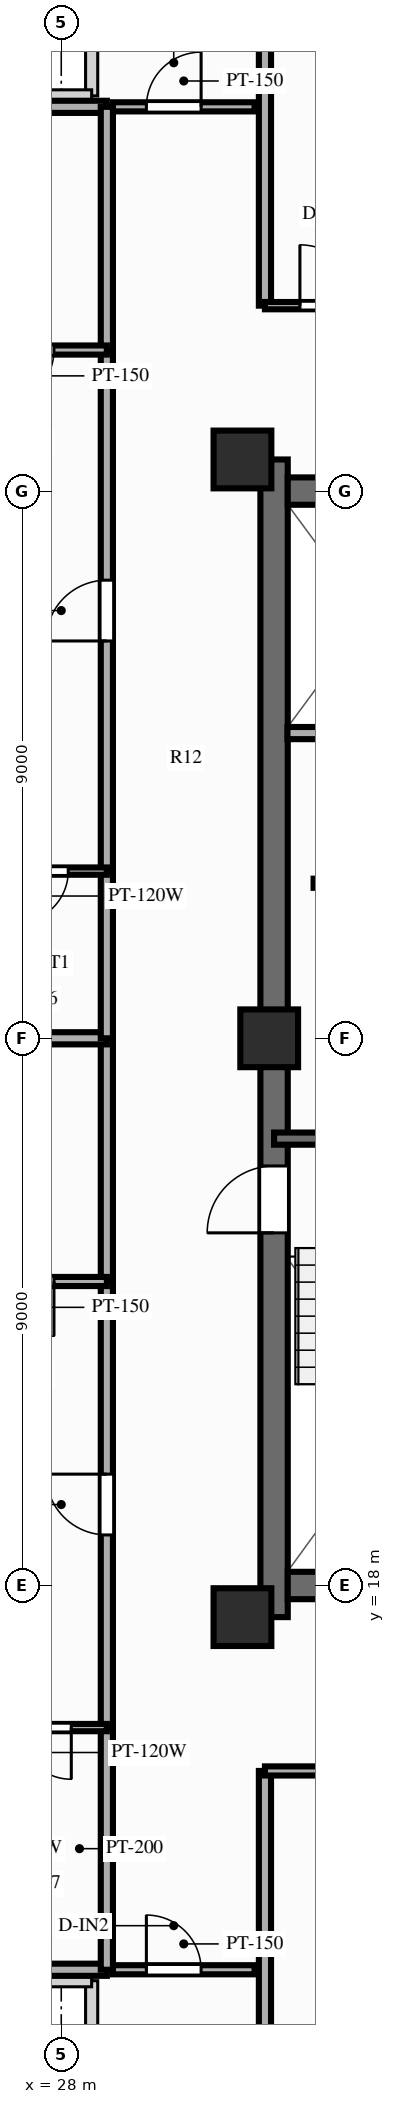
"""IFC4 building model, lengths in metres.
Left out: names, types, materials, properties, quantities, classifications, styles, units other than length and angle.
Written with IfcOpenShell. Run it as: python <this file> out.ifc"""

import sys

from ifc_helpers import new_model, si_unit, direction, frame, frame_2d, origin, origin_2d, place, context, subcontext, project, spatial, rectangle, extrude, source, transform, mapped, element, fill, save


model = new_model("IFC4")
c1 = context("Model", 3, precision=1e-05, world=origin(), true_north=direction((0.0, 1.0)))
c2 = subcontext(c1, "Body", "Model", "MODEL_VIEW")
j1 = project(units=[si_unit("LENGTHUNIT", "METRE"), si_unit("PLANEANGLEUNIT", "RADIAN")], contexts=[c1])
p1 = place(None, origin())
s1 = spatial("IfcSite", under=j1, at=p1, CompositionType="ELEMENT")
p2 = place(p1, origin())
s2 = spatial("IfcBuilding", under=s1, at=p2, CompositionType="ELEMENT")
p3 = place(p2, frame((0.0, 0.0, 246.0)))
s3 = spatial("IfcBuildingStorey", under=s2, at=p3, CompositionType="ELEMENT", Elevation=246.0)
p4 = place(p3, frame((31.5, 17.48, 0.0), z_axis=(0.0, 0.0, 1.0), x_axis=(0.0, 1.0, 0.0)))
e1 = element("IfcWall", 1, at=p4, inside=s3, PredefinedType="SHEAR", context=c2, shape_type="SweptSolid", body=[
    extrude(rectangle(XDim=19.04, YDim=0.45, at=frame_2d((9.52, 0.0))), origin(), (0.0, 0.0, 1.0), 3.0),
])
p5 = place(p4, frame((6.32, 0.0, 0.0)))
e2 = element("IfcOpeningElement", 2, at=p5, cuts=e1, PredefinedType="OPENING", context=c2, shape_type="SweptSolid", body=[
    extrude(rectangle(XDim=1.1, YDim=2.15, at=frame_2d((0.55, 1.075))), frame((0.0, 0.237, 0.0), z_axis=(0.0, -1.0, 0.0), x_axis=(1.0, 0.0, 0.0)), (0.0, 0.0, 1.0), 0.474),
])
p6 = place(p3, frame((31.725, 18.0, 0.0), z_axis=(0.0, 0.0, 1.0), x_axis=(1.0, 0.0, 0.0)))
e3 = element("IfcWall", 3, at=p6, inside=s3, PredefinedType="SHEAR", context=c2, shape_type="SweptSolid", body=[
    extrude(rectangle(XDim=12.55, YDim=0.45, at=frame_2d((6.275, 0.0))), origin(), (0.0, 0.0, 1.0), 3.0),
])
p7 = place(p3, frame((31.725, 36.0, 0.0), z_axis=(0.0, 0.0, 1.0), x_axis=(1.0, 0.0, 0.0)))
e4 = element("IfcWall", 4, at=p7, inside=s3, PredefinedType="SHEAR", context=c2, shape_type="SweptSolid", body=[
    extrude(rectangle(XDim=12.55, YDim=0.45, at=frame_2d((6.275, 0.0))), origin(), (0.0, 0.0, 1.0), 3.0),
])
p8 = place(p7, frame((5.225, 0.0, 0.0), z_axis=(0.0, 0.0, 1.0), x_axis=(-1.0, 0.0, 0.0)))
e5 = element("IfcOpeningElement", 5, at=p8, cuts=e4, PredefinedType="OPENING", context=c2, shape_type="SweptSolid", body=[
    extrude(rectangle(XDim=1.4, YDim=2.15, at=frame_2d((0.7, 1.075))), frame((0.0, 0.237, 0.0), z_axis=(0.0, -1.0, 0.0), x_axis=(1.0, 0.0, 0.0)), (0.0, 0.0, 1.0), 0.474),
])
m1 = source(origin(), c2, "Body", "SweptSolid", [
    extrude(rectangle(XDim=0.95, YDim=0.95, at=origin_2d()), origin(), (0.0, 0.0, 1.0), 3.0),
])
for number, where, z_axis, x_axis in (
    (6, (30.98, 17.48, 0.0), (0.0, 0.0, 1.0), (1.0, 0.0, 0.0)),
    (7, (30.98, 36.52, 0.0), (0.0, 0.0, 1.0), (1.0, 0.0, 0.0)),
    (8, (31.42, 27.0, 0.0), (0.0, 0.0, 1.0), (1.0, 0.0, 0.0)),
):
    element("IfcColumn", number, at=place(p3, frame(where, z_axis=z_axis, x_axis=x_axis)), inside=s3, PredefinedType="COLUMN", context=c2, shape_type="MappedRepresentation", body=[
        mapped(m1, transform((0.0, 0.0, 0.0), scale=1.0)),
    ])
p9 = place(p3, frame((32.15, 29.55, 0.0), z_axis=(0.0, 0.0, 1.0), x_axis=(1.0, 0.0, 0.0)))
e9 = element("IfcWall", 9, at=p9, inside=s3, PredefinedType="PARTITIONING", context=c2, shape_type="SweptSolid", body=[
    extrude(rectangle(XDim=2.27, YDim=0.15, at=frame_2d((1.135, 0.0))), origin(), (0.0, 0.0, 1.0), 2.74),
])
p10 = place(p3, frame((31.5, 25.35, 0.0), z_axis=(0.0, 0.0, 1.0), x_axis=(1.0, 0.0, 0.0)))
e10 = element("IfcWall", 10, at=p10, inside=s3, PredefinedType="SOLIDWALL", context=c2, shape_type="SweptSolid", body=[
    extrude(rectangle(XDim=3.93, YDim=0.2, at=frame_2d((1.965, 0.0))), origin(), (0.0, 0.0, 1.0), 2.74),
])
p11 = place(p3, frame((31.72, 32.02, 0.0), z_axis=(0.0, 0.0, 1.0), x_axis=(1.0, 0.0, 0.0)))
e11 = element("IfcWall", 11, at=p11, inside=s3, PredefinedType="PARTITIONING", context=c2, shape_type="SweptSolid", body=[
    extrude(rectangle(XDim=2.8, YDim=0.2, at=frame_2d((1.4, 0.0))), origin(), (0.0, 0.0, 1.0), 2.74),
])
p12 = place(p3, frame((28.85, 11.68, 0.0), z_axis=(0.0, 0.0, 1.0), x_axis=(1.0, 0.0, 0.0)))
e12 = element("IfcWall", 12, at=p12, inside=s3, PredefinedType="PARTITIONING", context=c2, shape_type="SweptSolid", body=[
    extrude(rectangle(XDim=2.33, YDim=0.15, at=frame_2d((1.165, 0.0))), origin(), (0.0, 0.0, 1.0), 2.74),
])
p13 = place(p12, frame((0.55, 0.0, 0.0)))
e13 = element("IfcOpeningElement", 13, at=p13, cuts=e12, PredefinedType="OPENING", context=c2, shape_type="SweptSolid", body=[
    extrude(rectangle(XDim=0.9, YDim=2.1, at=frame_2d((0.45, 1.05))), frame((0.0, 0.087, 0.0), z_axis=(0.0, -1.0, 0.0), x_axis=(1.0, 0.0, 0.0)), (0.0, 0.0, 1.0), 0.174),
])
p14 = place(p3, frame((28.85, 42.32, 0.0), z_axis=(0.0, 0.0, 1.0), x_axis=(1.0, 0.0, 0.0)))
e14 = element("IfcWall", 14, at=p14, inside=s3, PredefinedType="PARTITIONING", context=c2, shape_type="SweptSolid", body=[
    extrude(rectangle(XDim=2.33, YDim=0.15, at=frame_2d((1.165, 0.0))), origin(), (0.0, 0.0, 1.0), 2.74),
])
p15 = place(p14, frame((0.55, 0.0, 0.0)))
e15 = element("IfcOpeningElement", 15, at=p15, cuts=e14, PredefinedType="OPENING", context=c2, shape_type="SweptSolid", body=[
    extrude(rectangle(XDim=0.9, YDim=2.1, at=frame_2d((0.45, 1.05))), frame((0.0, 0.087, 0.0), z_axis=(0.0, -1.0, 0.0), x_axis=(1.0, 0.0, 0.0)), (0.0, 0.0, 1.0), 0.174),
])
p16 = place(p3, frame((31.35, 14.95, 0.0), z_axis=(0.0, 0.0, 1.0), x_axis=(0.0, -1.0, 0.0)))
e16 = element("IfcWall", 16, at=p16, inside=s3, PredefinedType="PARTITIONING", context=c2, shape_type="SweptSolid", body=[
    extrude(rectangle(XDim=8.8, YDim=0.2, at=frame_2d((4.4, 0.0))), origin(), (0.0, 0.0, 1.0), 2.39),
])
p17 = place(p3, frame((31.35, 14.95, 0.0), z_axis=(0.0, 0.0, 1.0), x_axis=(1.0, 0.0, 0.0)))
e17 = element("IfcWall", 17, at=p17, inside=s3, PredefinedType="PARTITIONING", context=c2, shape_type="SweptSolid", body=[
    extrude(rectangle(XDim=6.65, YDim=0.15, at=frame_2d((3.325, 0.0))), origin(), (0.0, 0.0, 1.0), 2.74),
])
p18 = place(p17, frame((2.775, 0.0, 0.0)))
e18 = element("IfcOpeningElement", 18, at=p18, cuts=e17, PredefinedType="OPENING", context=c2, shape_type="SweptSolid", body=[
    extrude(rectangle(XDim=1.1, YDim=2.15, at=frame_2d((0.55, 1.075))), frame((0.0, 0.087, 0.0), z_axis=(0.0, -1.0, 0.0), x_axis=(1.0, 0.0, 0.0)), (0.0, 0.0, 1.0), 0.174),
])
p19 = place(p3, frame((31.35, 39.05, 0.0), z_axis=(0.0, 0.0, 1.0), x_axis=(0.0, 1.0, 0.0)))
e19 = element("IfcWall", 19, at=p19, inside=s3, PredefinedType="PARTITIONING", context=c2, shape_type="SweptSolid", body=[
    extrude(rectangle(XDim=8.8, YDim=0.2, at=frame_2d((4.4, 0.0))), origin(), (0.0, 0.0, 1.0), 2.39),
])
p20 = place(p3, frame((31.35, 39.05, 0.0), z_axis=(0.0, 0.0, 1.0), x_axis=(1.0, 0.0, 0.0)))
e20 = element("IfcWall", 20, at=p20, inside=s3, PredefinedType="PARTITIONING", context=c2, shape_type="SweptSolid", body=[
    extrude(rectangle(XDim=2.15, YDim=0.12, at=frame_2d((1.075, 0.0))), origin(), (0.0, 0.0, 1.0), 2.74),
])
p21 = place(p20, frame((0.575, 0.0, 0.0)))
e21 = element("IfcOpeningElement", 21, at=p21, cuts=e20, PredefinedType="OPENING", context=c2, shape_type="SweptSolid", body=[
    extrude(rectangle(XDim=1.0, YDim=2.1, at=frame_2d((0.5, 1.05))), frame((0.0, 0.072, 0.0), z_axis=(0.0, -1.0, 0.0), x_axis=(1.0, 0.0, 0.0)), (0.0, 0.0, 1.0), 0.144),
])
for number, where, z_axis, x_axis in (
    (22, (28.75, 11.68, 0.0), (0.0, 0.0, 1.0), (-1.0, 0.0, 0.0)),
    (23, (28.75, 42.32, 0.0), (0.0, 0.0, 1.0), (-1.0, 0.0, 0.0)),
):
    element("IfcWall", number, at=place(p3, frame(where, z_axis=z_axis, x_axis=x_axis)), inside=s3, PredefinedType="PARTITIONING", context=c2, shape_type="SweptSolid", body=[
        extrude(rectangle(XDim=5.6, YDim=0.2, at=frame_2d((2.8, 0.0))), origin(), (0.0, 0.0, 1.0), 2.74),
    ])
p22 = place(p3, frame((28.75, 11.68, 0.0), z_axis=(0.0, 0.0, 1.0), x_axis=(0.0, 1.0, 0.0)))
e24 = element("IfcWall", 24, at=p22, inside=s3, PredefinedType="PARTITIONING", context=c2, shape_type="SweptSolid", body=[
    extrude(rectangle(XDim=3.983, YDim=0.2, at=frame_2d((1.992, 0.0))), origin(), (0.0, 0.0, 1.0), 2.74),
])
p23 = place(p3, frame((28.75, 15.663, 0.0), z_axis=(0.0, 0.0, 1.0), x_axis=(0.0, 1.0, 0.0)))
e25 = element("IfcWall", 25, at=p23, inside=s3, PredefinedType="PARTITIONING", context=c2, shape_type="SweptSolid", body=[
    extrude(rectangle(XDim=7.337, YDim=0.2, at=frame_2d((3.668, 0.0))), origin(), (0.0, 0.0, 1.0), 2.74),
])
p24 = place(p23, frame((3.168, 0.0, 0.0)))
e26 = element("IfcOpeningElement", 26, at=p24, cuts=e25, PredefinedType="OPENING", context=c2, shape_type="SweptSolid", body=[
    extrude(rectangle(XDim=1.0, YDim=2.15, at=frame_2d((0.5, 1.075))), frame((0.0, 0.112, 0.0), z_axis=(0.0, -1.0, 0.0), x_axis=(1.0, 0.0, 0.0)), (0.0, 0.0, 1.0), 0.224),
])
p25 = place(p3, frame((28.75, 23.0, 0.0), z_axis=(0.0, 0.0, 1.0), x_axis=(0.0, 1.0, 0.0)))
e27 = element("IfcWall", 27, at=p25, inside=s3, PredefinedType="PARTITIONING", context=c2, shape_type="SweptSolid", body=[
    extrude(rectangle(XDim=4.0, YDim=0.2, at=frame_2d((2.0, 0.0))), origin(), (0.0, 0.0, 1.0), 2.74),
])
p26 = place(p3, frame((28.75, 15.663, 0.0), z_axis=(0.0, 0.0, 1.0), x_axis=(-1.0, 0.0, 0.0)))
e28 = element("IfcWall", 28, at=p26, inside=s3, PredefinedType="PARTITIONING", context=c2, shape_type="SweptSolid", body=[
    extrude(rectangle(XDim=2.02, YDim=0.12, at=frame_2d((1.01, 0.0))), origin(), (0.0, 0.0, 1.0), 2.74),
])
p27 = place(p26, frame((0.585, 0.0, 0.0)))
e29 = element("IfcOpeningElement", 29, at=p27, cuts=e28, PredefinedType="OPENING", context=c2, shape_type="SweptSolid", body=[
    extrude(rectangle(XDim=0.85, YDim=2.05, at=frame_2d((0.425, 1.025))), frame((0.0, 0.072, 0.0), z_axis=(0.0, -1.0, 0.0), x_axis=(1.0, 0.0, 0.0)), (0.0, 0.0, 1.0), 0.144),
])
p28 = place(p3, frame((28.75, 23.0, 0.0), z_axis=(0.0, 0.0, 1.0), x_axis=(-1.0, 0.0, 0.0)))
e30 = element("IfcWall", 30, at=p28, inside=s3, PredefinedType="PARTITIONING", context=c2, shape_type="SweptSolid", body=[
    extrude(rectangle(XDim=2.64, YDim=0.15, at=frame_2d((1.32, 0.0))), origin(), (0.0, 0.0, 1.0), 2.74),
])
p29 = place(p28, frame((0.87, 0.0, 0.0)))
e31 = element("IfcOpeningElement", 31, at=p29, cuts=e30, PredefinedType="OPENING", context=c2, shape_type="SweptSolid", body=[
    extrude(rectangle(XDim=0.9, YDim=2.1, at=frame_2d((0.45, 1.05))), frame((0.0, 0.087, 0.0), z_axis=(0.0, -1.0, 0.0), x_axis=(1.0, 0.0, 0.0)), (0.0, 0.0, 1.0), 0.174),
])
p30 = place(p3, frame((28.75, 27.0, 0.0), z_axis=(0.0, 0.0, 1.0), x_axis=(-1.0, 0.0, 0.0)))
e32 = element("IfcWall", 32, at=p30, inside=s3, PredefinedType="PARTITIONING", context=c2, shape_type="SweptSolid", body=[
    extrude(rectangle(XDim=5.6, YDim=0.2, at=frame_2d((2.8, 0.0))), origin(), (0.0, 0.0, 1.0), 2.74),
])
p31 = place(p3, frame((28.75, 27.0, 0.0), z_axis=(0.0, 0.0, 1.0), x_axis=(0.0, 1.0, 0.0)))
e33 = element("IfcWall", 33, at=p31, inside=s3, PredefinedType="PARTITIONING", context=c2, shape_type="SweptSolid", body=[
    extrude(rectangle(XDim=2.75, YDim=0.2, at=frame_2d((1.375, 0.0))), origin(), (0.0, 0.0, 1.0), 2.74),
])
p32 = place(p3, frame((28.75, 29.75, 0.0), z_axis=(0.0, 0.0, 1.0), x_axis=(0.0, 1.0, 0.0)))
e34 = element("IfcWall", 34, at=p32, inside=s3, PredefinedType="PARTITIONING", context=c2, shape_type="SweptSolid", body=[
    extrude(rectangle(XDim=8.57, YDim=0.2, at=frame_2d((4.285, 0.0))), origin(), (0.0, 0.0, 1.0), 2.74),
])
p33 = place(p32, frame((3.785, 0.0, 0.0)))
e35 = element("IfcOpeningElement", 35, at=p33, cuts=e34, PredefinedType="OPENING", context=c2, shape_type="SweptSolid", body=[
    extrude(rectangle(XDim=1.0, YDim=2.15, at=frame_2d((0.5, 1.075))), frame((0.0, 0.112, 0.0), z_axis=(0.0, -1.0, 0.0), x_axis=(1.0, 0.0, 0.0)), (0.0, 0.0, 1.0), 0.224),
])
p34 = place(p3, frame((28.75, 38.32, 0.0), z_axis=(0.0, 0.0, 1.0), x_axis=(0.0, 1.0, 0.0)))
e36 = element("IfcWall", 36, at=p34, inside=s3, PredefinedType="PARTITIONING", context=c2, shape_type="SweptSolid", body=[
    extrude(rectangle(XDim=4.0, YDim=0.2, at=frame_2d((2.0, 0.0))), origin(), (0.0, 0.0, 1.0), 2.74),
])
p35 = place(p3, frame((28.75, 29.75, 0.0), z_axis=(0.0, 0.0, 1.0), x_axis=(-1.0, 0.0, 0.0)))
e37 = element("IfcWall", 37, at=p35, inside=s3, PredefinedType="PARTITIONING", context=c2, shape_type="SweptSolid", body=[
    extrude(rectangle(XDim=2.12, YDim=0.12, at=frame_2d((1.06, 0.0))), origin(), (0.0, 0.0, 1.0), 2.74),
])
p36 = place(p35, frame((0.635, 0.0, 0.0)))
e38 = element("IfcOpeningElement", 38, at=p36, cuts=e37, PredefinedType="OPENING", context=c2, shape_type="SweptSolid", body=[
    extrude(rectangle(XDim=0.85, YDim=2.05, at=frame_2d((0.425, 1.025))), frame((0.0, 0.072, 0.0), z_axis=(0.0, -1.0, 0.0), x_axis=(1.0, 0.0, 0.0)), (0.0, 0.0, 1.0), 0.144),
])
p37 = place(p3, frame((28.75, 38.32, 0.0), z_axis=(0.0, 0.0, 1.0), x_axis=(-1.0, 0.0, 0.0)))
e39 = element("IfcWall", 39, at=p37, inside=s3, PredefinedType="PARTITIONING", context=c2, shape_type="SweptSolid", body=[
    extrude(rectangle(XDim=2.64, YDim=0.15, at=frame_2d((1.32, 0.0))), origin(), (0.0, 0.0, 1.0), 2.74),
])
p38 = place(p37, frame((0.87, 0.0, 0.0)))
e40 = element("IfcOpeningElement", 40, at=p38, cuts=e39, PredefinedType="OPENING", context=c2, shape_type="SweptSolid", body=[
    extrude(rectangle(XDim=0.9, YDim=2.1, at=frame_2d((0.45, 1.05))), frame((0.0, 0.087, 0.0), z_axis=(0.0, -1.0, 0.0), x_axis=(1.0, 0.0, 0.0)), (0.0, 0.0, 1.0), 0.174),
])
m2 = source(origin(), c2, "Body", "SweptSolid", [
    extrude(rectangle(XDim=1.1, YDim=2.15, at=frame_2d((0.55, 1.075))), frame((0.0, 0.025, 0.0), z_axis=(0.0, -1.0, 0.0), x_axis=(1.0, 0.0, 0.0)), (0.0, 0.0, 1.0), 0.05),
])
p39 = place(p5, origin())
e41 = element("IfcDoor", 41, at=p39, inside=s3, OperationType="SINGLE_SWING_LEFT", PredefinedType="DOOR", context=c2, shape_type="MappedRepresentation", body=[
    mapped(m2, transform((0.0, 0.0, 0.0), scale=1.0)),
])
fill(e2, e41)
m3 = source(origin(), c2, "Body", "SweptSolid", [
    extrude(rectangle(XDim=0.9, YDim=2.1, at=frame_2d((0.45, 1.05))), frame((0.0, 0.025, 0.0), z_axis=(0.0, -1.0, 0.0), x_axis=(1.0, 0.0, 0.0)), (0.0, 0.0, 1.0), 0.05),
])
p40 = place(p13, origin())
e42 = element("IfcDoor", 42, at=p40, inside=s3, OperationType="SINGLE_SWING_LEFT", PredefinedType="DOOR", context=c2, shape_type="MappedRepresentation", body=[
    mapped(m3, transform((0.0, 0.0, 0.0), scale=1.0)),
])
fill(e13, e42)
p41 = place(p15, origin())
e43 = element("IfcDoor", 43, at=p41, inside=s3, OperationType="SINGLE_SWING_RIGHT", PredefinedType="DOOR", context=c2, shape_type="MappedRepresentation", body=[
    mapped(m3, transform((0.0, 0.0, 0.0), scale=1.0)),
])
fill(e15, e43)
m4 = source(origin(), c2, "Body", "SweptSolid", [
    extrude(rectangle(XDim=1.0, YDim=2.1, at=frame_2d((0.5, 1.05))), frame((0.0, 0.025, 0.0), z_axis=(0.0, -1.0, 0.0), x_axis=(1.0, 0.0, 0.0)), (0.0, 0.0, 1.0), 0.05),
])
p42 = place(p21, origin())
e44 = element("IfcDoor", 44, at=p42, inside=s3, OperationType="SINGLE_SWING_LEFT", PredefinedType="DOOR", context=c2, shape_type="MappedRepresentation", body=[
    mapped(m4, transform((0.0, 0.0, 0.0), scale=1.0)),
])
fill(e21, e44)
m5 = source(origin(), c2, "Body", "SweptSolid", [
    extrude(rectangle(XDim=1.0, YDim=2.15, at=frame_2d((0.5, 1.075))), frame((0.0, 0.025, 0.0), z_axis=(0.0, -1.0, 0.0), x_axis=(1.0, 0.0, 0.0)), (0.0, 0.0, 1.0), 0.05),
])
p43 = place(p24, origin())
e45 = element("IfcDoor", 45, at=p43, inside=s3, OperationType="SINGLE_SWING_RIGHT", PredefinedType="DOOR", context=c2, shape_type="MappedRepresentation", body=[
    mapped(m5, transform((0.0, 0.0, 0.0), scale=1.0)),
])
fill(e26, e45)
m6 = source(origin(), c2, "Body", "SweptSolid", [
    extrude(rectangle(XDim=0.85, YDim=2.05, at=frame_2d((0.425, 1.025))), frame((0.0, 0.025, 0.0), z_axis=(0.0, -1.0, 0.0), x_axis=(1.0, 0.0, 0.0)), (0.0, 0.0, 1.0), 0.05),
])
p44 = place(p27, origin())
e46 = element("IfcDoor", 46, at=p44, inside=s3, OperationType="SINGLE_SWING_LEFT", PredefinedType="DOOR", context=c2, shape_type="MappedRepresentation", body=[
    mapped(m6, transform((0.0, 0.0, 0.0), scale=1.0)),
])
fill(e29, e46)
p45 = place(p29, origin())
e47 = element("IfcDoor", 47, at=p45, inside=s3, OperationType="SINGLE_SWING_LEFT", PredefinedType="DOOR", context=c2, shape_type="MappedRepresentation", body=[
    mapped(m3, transform((0.0, 0.0, 0.0), scale=1.0)),
])
fill(e31, e47)
p46 = place(p33, origin())
e48 = element("IfcDoor", 48, at=p46, inside=s3, OperationType="SINGLE_SWING_LEFT", PredefinedType="DOOR", context=c2, shape_type="MappedRepresentation", body=[
    mapped(m5, transform((0.0, 0.0, 0.0), scale=1.0)),
])
fill(e35, e48)
p47 = place(p36, origin())
e49 = element("IfcDoor", 49, at=p47, inside=s3, OperationType="SINGLE_SWING_RIGHT", PredefinedType="DOOR", context=c2, shape_type="MappedRepresentation", body=[
    mapped(m6, transform((0.0, 0.0, 0.0), scale=1.0)),
])
fill(e38, e49)
p48 = place(p38, origin())
e50 = element("IfcDoor", 50, at=p48, inside=s3, OperationType="SINGLE_SWING_RIGHT", PredefinedType="DOOR", context=c2, shape_type="MappedRepresentation", body=[
    mapped(m3, transform((0.0, 0.0, 0.0), scale=1.0)),
])
fill(e40, e50)
save(model, sys.argv[1])
